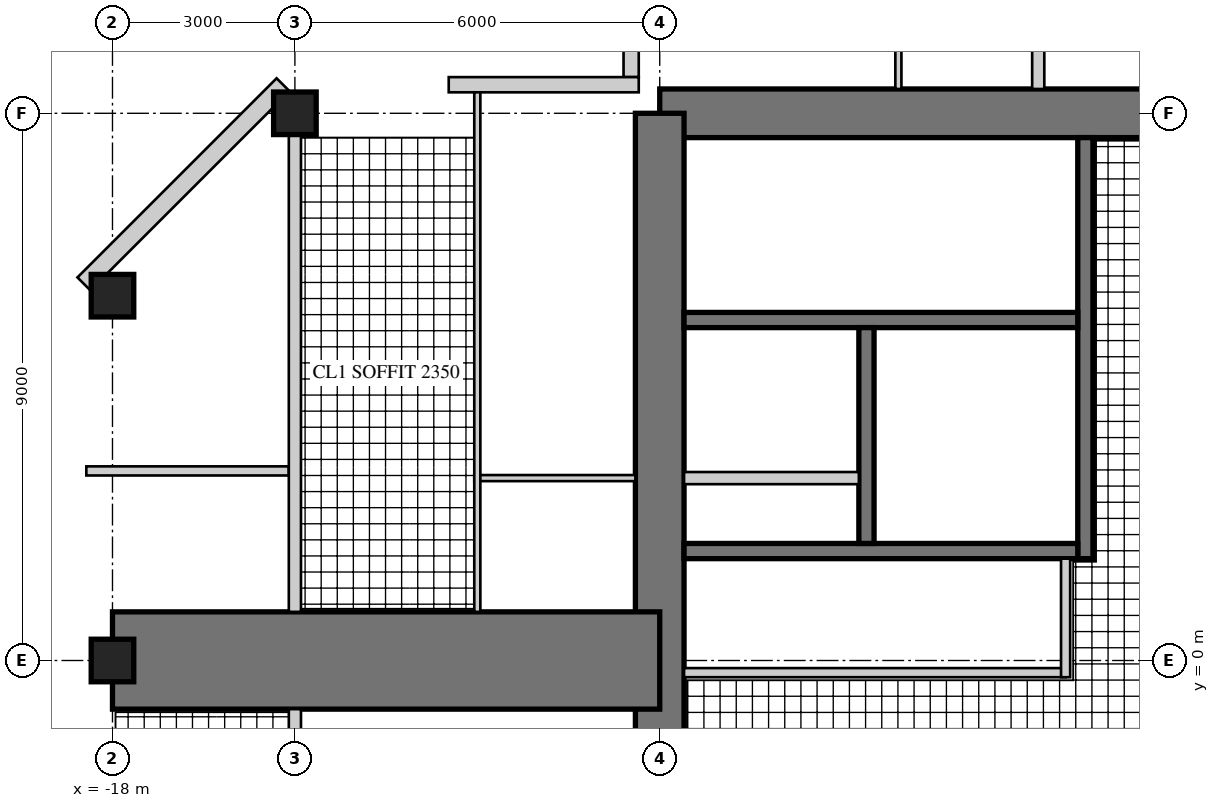
"""IFC4 building model, lengths in metres.
Left out: names, types, materials, properties, quantities, classifications, styles, units other than length and angle.
Written with IfcOpenShell. Run it as: python <this file> out.ifc"""

import sys

from ifc_helpers import new_model, si_unit, direction, frame, frame_2d, origin, origin_2d, place, context, subcontext, project, spatial, rectangle, hollow_rectangle, extrude, element, fill, save


model = new_model("IFC4")
c1 = context("Model", 3, precision=1e-05, world=origin(), true_north=direction((0.0, 1.0)))
c2 = subcontext(c1, "Body", "Model", "MODEL_VIEW")
j1 = project(units=[si_unit("LENGTHUNIT", "METRE"), si_unit("PLANEANGLEUNIT", "RADIAN")], contexts=[c1])
p1 = place(None, origin())
s1 = spatial("IfcSite", under=j1, at=p1, CompositionType="ELEMENT")
p2 = place(p1, origin())
s2 = spatial("IfcBuilding", under=s1, at=p2, CompositionType="ELEMENT")
p3 = place(p2, frame((0.0, 0.0, 261.1)))
s3 = spatial("IfcBuildingStorey", under=s2, at=p3, CompositionType="ELEMENT", Elevation=261.1)
p4 = place(p3, frame((9.0, 9.0, 0.0), z_axis=(0.0, 0.0, 1.0), x_axis=(-1.0, 0.0, 0.0)))
e1 = element("IfcWall", 1, at=p4, inside=s3, PredefinedType="SHEAR", context=c2, shape_type="SweptSolid", body=[
    extrude(rectangle(XDim=18.0, YDim=0.8, at=frame_2d((9.0, 0.0))), origin(), (0.0, 0.0, 1.0), 3.4),
])
p5 = place(p4, frame((9.8, 0.0, 0.0)))
e2 = element("IfcOpeningElement", 2, at=p5, cuts=e1, PredefinedType="OPENING", context=c2, shape_type="SweptSolid", body=[
    extrude(rectangle(XDim=1.0, YDim=2.4, at=frame_2d((0.5, 1.2))), frame((0.0, 0.41, 0.0), z_axis=(0.0, -1.0, 0.0), x_axis=(1.0, 0.0, 0.0)), (0.0, 0.0, 1.0), 0.82),
])
p6 = place(p3, frame((-9.0, 9.0, 0.0), z_axis=(0.0, 0.0, 1.0), x_axis=(0.0, -1.0, 0.0)))
e3 = element("IfcWall", 3, at=p6, inside=s3, PredefinedType="SHEAR", context=c2, shape_type="SweptSolid", body=[
    extrude(rectangle(XDim=18.0, YDim=0.8, at=frame_2d((9.0, 0.0))), origin(), (0.0, 0.0, 1.0), 3.4),
])
p7 = place(p6, frame((9.8, 0.0, 0.0)))
e4 = element("IfcOpeningElement", 4, at=p7, cuts=e3, PredefinedType="OPENING", context=c2, shape_type="SweptSolid", body=[
    extrude(rectangle(XDim=1.0, YDim=2.4, at=frame_2d((0.5, 1.2))), frame((0.0, 0.41, 0.0), z_axis=(0.0, -1.0, 0.0), x_axis=(1.0, 0.0, 0.0)), (0.0, 0.0, 1.0), 0.82),
])
p8 = place(p3, frame((-2.0, 1.675, 0.0), z_axis=(0.0, 0.0, 1.0), x_axis=(0.0, 1.0, 0.0)))
e5 = element("IfcWall", 5, at=p8, inside=s3, PredefinedType="SHEAR", context=c2, shape_type="SweptSolid", body=[
    extrude(rectangle(XDim=6.925, YDim=0.25, at=frame_2d((3.462, 0.0))), origin(), (0.0, 0.0, 1.0), 3.4),
])
p9 = place(p8, frame((0.725, 0.0, 0.0)))
e6 = element("IfcOpeningElement", 6, at=p9, cuts=e5, PredefinedType="OPENING", context=c2, shape_type="SweptSolid", body=[
    extrude(rectangle(XDim=1.0, YDim=2.1, at=frame_2d((0.5, 1.05))), frame((0.0, 0.135, 0.0), z_axis=(0.0, -1.0, 0.0), x_axis=(1.0, 0.0, 0.0)), (0.0, 0.0, 1.0), 0.27),
])
p10 = place(p3, frame((-2.125, 1.8, 0.0), z_axis=(0.0, 0.0, 1.0), x_axis=(-1.0, 0.0, 0.0)))
e7 = element("IfcWall", 7, at=p10, inside=s3, PredefinedType="SHEAR", context=c2, shape_type="SweptSolid", body=[
    extrude(rectangle(XDim=6.475, YDim=0.25, at=frame_2d((3.238, 0.0))), origin(), (0.0, 0.0, 1.0), 3.4),
])
p11 = place(p3, frame((-2.125, 5.6, 0.0), z_axis=(0.0, 0.0, 1.0), x_axis=(-1.0, 0.0, 0.0)))
e8 = element("IfcWall", 8, at=p11, inside=s3, PredefinedType="SHEAR", context=c2, shape_type="SweptSolid", body=[
    extrude(rectangle(XDim=6.475, YDim=0.25, at=frame_2d((3.238, 0.0))), origin(), (0.0, 0.0, 1.0), 3.4),
])
p12 = place(p11, frame((0.175, 0.0, 0.0)))
e9 = element("IfcOpeningElement", 9, at=p12, cuts=e8, PredefinedType="OPENING", context=c2, shape_type="SweptSolid", body=[
    extrude(rectangle(XDim=1.0, YDim=2.1, at=frame_2d((0.5, 1.05))), frame((0.0, 0.135, 0.0), z_axis=(0.0, -1.0, 0.0), x_axis=(1.0, 0.0, 0.0)), (0.0, 0.0, 1.0), 0.27),
])
p13 = place(p3, frame((-5.6, 1.925, 0.0), z_axis=(0.0, 0.0, 1.0), x_axis=(0.0, 1.0, 0.0)))
e10 = element("IfcWall", 10, at=p13, inside=s3, PredefinedType="SHEAR", context=c2, shape_type="SweptSolid", body=[
    extrude(rectangle(XDim=3.55, YDim=0.25, at=frame_2d((1.775, 0.0))), origin(), (0.0, 0.0, 1.0), 3.4),
])
p14 = place(p13, frame((1.525, 0.0, 0.0)))
e11 = element("IfcOpeningElement", 11, at=p14, cuts=e10, PredefinedType="OPENING", context=c2, shape_type="SweptSolid", body=[
    extrude(rectangle(XDim=1.1, YDim=2.2, at=frame_2d((0.55, 1.1))), frame((0.0, 0.135, 0.0), z_axis=(0.0, -1.0, 0.0), x_axis=(1.0, 0.0, 0.0)), (0.0, 0.0, 1.0), 0.27),
])
p15 = place(p13, frame((0.075, 0.0, 0.0)))
e12 = element("IfcOpeningElement", 12, at=p15, cuts=e10, PredefinedType="OPENING", context=c2, shape_type="SweptSolid", body=[
    extrude(rectangle(XDim=0.8, YDim=2.1, at=frame_2d((0.4, 1.05))), frame((0.0, 0.135, 0.0), z_axis=(0.0, -1.0, 0.0), x_axis=(1.0, 0.0, 0.0)), (0.0, 0.0, 1.0), 0.27),
])
p16 = place(p3, frame((-5.725, 3.0, 0.0), z_axis=(0.0, 0.0, 1.0), x_axis=(-1.0, 0.0, 0.0)))
e13 = element("IfcWall", 13, at=p16, inside=s3, PredefinedType="PARTITIONING", context=c2, shape_type="SweptSolid", body=[
    extrude(rectangle(XDim=2.875, YDim=0.2, at=frame_2d((1.438, 0.0))), origin(), (0.0, 0.0, 1.0), 3.4),
])
p17 = place(p3, frame((-9.0, 0.0, 0.0), z_axis=(0.0, 0.0, 1.0), x_axis=(-1.0, 0.0, 0.0)))
e14 = element("IfcWall", 14, at=p17, inside=s3, PredefinedType="SHEAR", context=c2, shape_type="SweptSolid", body=[
    extrude(rectangle(XDim=9.0, YDim=1.6, at=frame_2d((4.5, 0.0))), origin(), (0.0, 0.0, 1.0), 3.4),
])
p18 = place(p17, frame((3.8, 0.0, 0.0)))
e15 = element("IfcOpeningElement", 15, at=p18, cuts=e14, PredefinedType="OPENING", context=c2, shape_type="SweptSolid", body=[
    extrude(rectangle(XDim=1.0, YDim=2.15, at=frame_2d((0.5, 1.075))), frame((0.0, 0.81, 0.0), z_axis=(0.0, -1.0, 0.0), x_axis=(1.0, 0.0, 0.0)), (0.0, 0.0, 1.0), 1.62),
])
p19 = place(p17, frame((7.0, 0.0, 0.0)))
e16 = element("IfcOpeningElement", 16, at=p19, cuts=e14, PredefinedType="OPENING", context=c2, shape_type="SweptSolid", body=[
    extrude(rectangle(XDim=1.0, YDim=2.2, at=frame_2d((0.5, 1.1))), frame((0.0, 0.81, 0.0), z_axis=(0.0, -1.0, 0.0), x_axis=(1.0, 0.0, 0.0)), (0.0, 0.0, 1.0), 1.62),
])
for number, where, z_axis, x_axis in (
    (17, (-15.0, 9.0, 0.0), (0.0, 0.0, 1.0), (1.0, 0.0, 0.0)),
    (18, (-18.0, 6.0, 0.0), (0.0, 0.0, 1.0), (1.0, 0.0, 0.0)),
    (19, (-18.0, 0.0, 0.0), (0.0, 0.0, 1.0), (1.0, 0.0, 0.0)),
):
    element("IfcColumn", number, at=place(p3, frame(where, z_axis=z_axis, x_axis=x_axis)), inside=s3, PredefinedType="COLUMN", context=c2, shape_type="SweptSolid", body=[
        extrude(rectangle(XDim=0.7, YDim=0.7, at=origin_2d()), origin(), (0.0, 0.0, 1.0), 3.4),
    ])
p20 = place(p3, frame((-9.47, 12.47, 0.0), z_axis=(0.0, 0.0, 1.0), x_axis=(0.0, -1.0, 0.0)))
e20 = element("IfcWall", 20, at=p20, inside=s3, PredefinedType="SOLIDWALL", context=c2, shape_type="SweptSolid", body=[
    extrude(rectangle(XDim=2.875, YDim=0.25, at=frame_2d((1.438, 0.0))), origin(), (0.0, 0.0, 1.0), 3.22),
])
p21 = place(p20, frame((0.6, 0.0, 0.0)))
e21 = element("IfcOpeningElement", 21, at=p21, cuts=e20, PredefinedType="OPENING", context=c2, shape_type="SweptSolid", body=[
    extrude(rectangle(XDim=1.0, YDim=2.2, at=frame_2d((0.5, 1.1))), frame((0.0, 0.135, 0.0), z_axis=(0.0, -1.0, 0.0), x_axis=(1.0, 0.0, 0.0)), (0.0, 0.0, 1.0), 0.27),
])
p22 = place(p3, frame((-9.345, 9.47, 0.0), z_axis=(0.0, 0.0, 1.0), x_axis=(-1.0, 0.0, 0.0)))
e22 = element("IfcWall", 22, at=p22, inside=s3, PredefinedType="SOLIDWALL", context=c2, shape_type="SweptSolid", body=[
    extrude(rectangle(XDim=3.125, YDim=0.25, at=frame_2d((1.562, 0.0))), origin(), (0.0, 0.0, 1.0), 3.22),
])
p23 = place(p22, frame((0.6, 0.0, 0.0)))
e23 = element("IfcOpeningElement", 23, at=p23, cuts=e22, PredefinedType="OPENING", context=c2, shape_type="SweptSolid", body=[
    extrude(rectangle(XDim=1.0, YDim=2.2, at=frame_2d((0.5, 1.1))), frame((0.0, 0.135, 0.0), z_axis=(0.0, -1.0, 0.0), x_axis=(1.0, 0.0, 0.0)), (0.0, 0.0, 1.0), 0.27),
])
p24 = place(p3, frame((-15.195, 9.47, 0.0), z_axis=(0.0, 0.0, 1.0), x_axis=(-0.707106781187, -0.707106781187, 0.0)))
e24 = element("IfcWall", 24, at=p24, inside=s3, PredefinedType="SOLIDWALL", context=c2, shape_type="SweptSolid", body=[
    extrude(rectangle(XDim=4.632, YDim=0.3, at=frame_2d((2.316, 0.0))), origin(), (0.0, 0.0, 1.0), 3.22),
])
p25 = place(p24, frame((1.866, 0.0, 0.3)))
e25 = element("IfcOpeningElement", 25, at=p25, cuts=e24, PredefinedType="OPENING", context=c2, shape_type="SweptSolid", body=[
    extrude(rectangle(XDim=0.9, YDim=2.4, at=frame_2d((0.45, 1.2))), frame((0.0, 0.16, 0.0), z_axis=(0.0, -1.0, 0.0), x_axis=(1.0, 0.0, 0.0)), (0.0, 0.0, 1.0), 0.32),
])
p26 = place(p3, frame((-2.325, -0.2, 0.0), z_axis=(0.0, 0.0, 1.0), x_axis=(-1.0, 0.0, 0.0)))
e26 = element("IfcWall", 26, at=p26, inside=s3, PredefinedType="PARTITIONING", context=c2, shape_type="SweptSolid", body=[
    extrude(rectangle(XDim=6.275, YDim=0.15, at=frame_2d((3.138, 0.0))), origin(), (0.0, 0.0, 1.0), 3.22),
])
p27 = place(p26, frame((0.4, 0.0, 0.0)))
e27 = element("IfcOpeningElement", 27, at=p27, cuts=e26, PredefinedType="OPENING", context=c2, shape_type="SweptSolid", body=[
    extrude(rectangle(XDim=1.0, YDim=2.1, at=frame_2d((0.5, 1.05))), frame((0.0, 0.085, 0.0), z_axis=(0.0, -1.0, 0.0), x_axis=(1.0, 0.0, 0.0)), (0.0, 0.0, 1.0), 0.17),
])
p28 = place(p3, frame((-2.325, 1.675, 0.0), z_axis=(0.0, 0.0, 1.0), x_axis=(0.0, -1.0, 0.0)))
e28 = element("IfcWall", 28, at=p28, inside=s3, PredefinedType="PARTITIONING", context=c2, shape_type="SweptSolid", body=[
    extrude(rectangle(XDim=1.95, YDim=0.15, at=frame_2d((0.975, 0.0))), origin(), (0.0, 0.0, 1.0), 3.22),
])
p29 = place(p3, frame((-5.075, 9.4, 0.0), z_axis=(0.0, 0.0, 1.0), x_axis=(0.0, 1.0, 0.0)))
e29 = element("IfcWall", 29, at=p29, inside=s3, PredefinedType="PARTITIONING", context=c2, shape_type="SweptSolid", body=[
    extrude(rectangle(XDim=3.25, YDim=0.1, at=frame_2d((1.625, 0.0))), origin(), (0.0, 0.0, 1.0), 3.22),
])
p30 = place(p3, frame((-2.775, 9.4, 0.0), z_axis=(0.0, 0.0, 1.0), x_axis=(0.0, 1.0, 0.0)))
e30 = element("IfcWall", 30, at=p30, inside=s3, PredefinedType="SOLIDWALL", context=c2, shape_type="SweptSolid", body=[
    extrude(rectangle(XDim=5.6, YDim=0.2, at=frame_2d((2.8, 0.0))), origin(), (0.0, 0.0, 1.0), 3.22),
])
p31 = place(p30, frame((3.75, 0.0, 0.0)))
e31 = element("IfcOpeningElement", 31, at=p31, cuts=e30, PredefinedType="OPENING", context=c2, shape_type="SweptSolid", body=[
    extrude(rectangle(XDim=1.0, YDim=2.15, at=frame_2d((0.5, 1.075))), frame((0.0, 0.11, 0.0), z_axis=(0.0, -1.0, 0.0), x_axis=(1.0, 0.0, 0.0)), (0.0, 0.0, 1.0), 0.22),
])
p32 = place(p3, frame((-9.4, 3.0, 0.0), z_axis=(0.0, 0.0, 1.0), x_axis=(-1.0, 0.0, 0.0)))
e32 = element("IfcWall", 32, at=p32, inside=s3, PredefinedType="PARTITIONING", context=c2, shape_type="SweptSolid", body=[
    extrude(rectangle(XDim=2.65, YDim=0.1, at=frame_2d((1.325, 0.0))), origin(), (0.0, 0.0, 1.0), 3.22),
])
p33 = place(p3, frame((-12.0, 9.345, 0.0), z_axis=(0.0, 0.0, 1.0), x_axis=(0.0, -1.0, 0.0)))
e33 = element("IfcWall", 33, at=p33, inside=s3, PredefinedType="PARTITIONING", context=c2, shape_type="SweptSolid", body=[
    extrude(rectangle(XDim=8.545, YDim=0.1, at=frame_2d((4.272, 0.0))), origin(), (0.0, 0.0, 1.0), 3.22),
])
p34 = place(p33, frame((4.995, 0.0, 0.0)))
e34 = element("IfcOpeningElement", 34, at=p34, cuts=e33, PredefinedType="OPENING", context=c2, shape_type="SweptSolid", body=[
    extrude(rectangle(XDim=0.9, YDim=2.1, at=frame_2d((0.45, 1.05))), frame((0.0, 0.06, 0.0), z_axis=(0.0, -1.0, 0.0), x_axis=(1.0, 0.0, 0.0)), (0.0, 0.0, 1.0), 0.12),
])
p35 = place(p33, frame((7.095, 0.0, 0.0)))
e35 = element("IfcOpeningElement", 35, at=p35, cuts=e33, PredefinedType="OPENING", context=c2, shape_type="SweptSolid", body=[
    extrude(rectangle(XDim=0.9, YDim=2.1, at=frame_2d((0.45, 1.05))), frame((0.0, 0.06, 0.0), z_axis=(0.0, -1.0, 0.0), x_axis=(1.0, 0.0, 0.0)), (0.0, 0.0, 1.0), 0.12),
])
p36 = place(p3, frame((-15.1, 3.118, 0.0), z_axis=(0.0, 0.0, 1.0), x_axis=(-1.0, 0.0, 0.0)))
e36 = element("IfcWall", 36, at=p36, inside=s3, PredefinedType="PARTITIONING", context=c2, shape_type="SweptSolid", body=[
    extrude(rectangle(XDim=3.33, YDim=0.15, at=frame_2d((1.665, 0.0))), origin(), (0.0, 0.0, 1.0), 3.22),
])
p37 = place(p36, frame((0.6, 0.0, 0.0)))
e37 = element("IfcOpeningElement", 37, at=p37, cuts=e36, PredefinedType="OPENING", context=c2, shape_type="SweptSolid", body=[
    extrude(rectangle(XDim=1.0, YDim=2.1, at=frame_2d((0.5, 1.05))), frame((0.0, 0.085, 0.0), z_axis=(0.0, -1.0, 0.0), x_axis=(1.0, 0.0, 0.0)), (0.0, 0.0, 1.0), 0.17),
])
p38 = place(p3, frame((-15.0, 8.65, 0.0), z_axis=(0.0, 0.0, 1.0), x_axis=(0.0, -1.0, 0.0)))
e38 = element("IfcWall", 38, at=p38, inside=s3, PredefinedType="SOLIDWALL", context=c2, shape_type="SweptSolid", body=[
    extrude(rectangle(XDim=7.85, YDim=0.2, at=frame_2d((3.925, 0.0))), origin(), (0.0, 0.0, 1.0), 2.52),
])
p39 = place(p3, frame((-15.0, -0.8, 0.0), z_axis=(0.0, 0.0, 1.0), x_axis=(0.0, -1.0, 0.0)))
e39 = element("IfcWall", 39, at=p39, inside=s3, PredefinedType="SOLIDWALL", context=c2, shape_type="SweptSolid", body=[
    extrude(rectangle(XDim=7.85, YDim=0.2, at=frame_2d((3.925, 0.0))), origin(), (0.0, 0.0, 1.0), 2.52),
])
p40 = place(p39, frame((0.35, 0.0, 0.0)))
e40 = element("IfcOpeningElement", 40, at=p40, cuts=e39, PredefinedType="OPENING", context=c2, shape_type="SweptSolid", body=[
    extrude(rectangle(XDim=1.0, YDim=2.2, at=frame_2d((0.5, 1.1))), frame((0.0, 0.11, 0.0), z_axis=(0.0, -1.0, 0.0), x_axis=(1.0, 0.0, 0.0)), (0.0, 0.0, 1.0), 0.22),
])
p41 = place(p23, origin())
e41 = element("IfcDoor", 41, at=p41, inside=s3, OperationType="SINGLE_SWING_LEFT", PredefinedType="DOOR", context=c2, shape_type="SweptSolid", body=[
    extrude(hollow_rectangle(XDim=1.0, YDim=2.2, WallThickness=0.06, at=frame_2d((0.5, 1.1))), frame((0.0, 0.025, 0.0), z_axis=(0.0, -1.0, 0.0), x_axis=(1.0, 0.0, 0.0)), (0.0, 0.0, 1.0), 0.05),
    extrude(rectangle(XDim=0.879, YDim=2.079, at=frame_2d((0.5, 1.1))), frame((0.0, 0.025, 0.0), z_axis=(0.0, -1.0, 0.0), x_axis=(1.0, 0.0, 0.0)), (0.0, 0.0, 1.0), 0.05),
])
fill(e23, e41)
p42 = place(p25, origin())
e42 = element("IfcWindow", 42, at=p42, inside=s3, PartitioningType="SINGLE_PANEL", PredefinedType="WINDOW", context=c2, shape_type="SweptSolid", body=[
    extrude(hollow_rectangle(XDim=0.9, YDim=2.4, WallThickness=0.06, at=frame_2d((0.45, 1.2))), frame((0.0, 0.03, 0.0), z_axis=(0.0, -1.0, 0.0), x_axis=(1.0, 0.0, 0.0)), (0.0, 0.0, 1.0), 0.06),
    extrude(rectangle(XDim=0.779, YDim=2.279, at=frame_2d((0.45, 1.2))), frame((0.0, 0.03, 0.0), z_axis=(0.0, -1.0, 0.0), x_axis=(1.0, 0.0, 0.0)), (0.0, 0.0, 1.0), 0.06),
])
fill(e25, e42)
p43 = place(p27, frame((1.0, 0.0, 0.0), z_axis=(0.0, 0.0, 1.0), x_axis=(-1.0, 0.0, 0.0)))
e43 = element("IfcDoor", 43, at=p43, inside=s3, OperationType="SINGLE_SWING_RIGHT", PredefinedType="DOOR", context=c2, shape_type="SweptSolid", body=[
    extrude(rectangle(XDim=1.0, YDim=2.1, at=frame_2d((0.5, 1.05))), frame((0.0, 0.025, 0.0), z_axis=(0.0, -1.0, 0.0), x_axis=(1.0, 0.0, 0.0)), (0.0, 0.0, 1.0), 0.05),
])
fill(e27, e43)
p44 = place(p34, origin())
e44 = element("IfcDoor", 44, at=p44, inside=s3, OperationType="SINGLE_SWING_RIGHT", PredefinedType="DOOR", context=c2, shape_type="SweptSolid", body=[
    extrude(rectangle(XDim=0.9, YDim=2.1, at=frame_2d((0.45, 1.05))), frame((0.0, 0.025, 0.0), z_axis=(0.0, -1.0, 0.0), x_axis=(1.0, 0.0, 0.0)), (0.0, 0.0, 1.0), 0.05),
])
fill(e34, e44)
p45 = place(p35, origin())
e45 = element("IfcDoor", 45, at=p45, inside=s3, OperationType="SINGLE_SWING_RIGHT", PredefinedType="DOOR", context=c2, shape_type="SweptSolid", body=[
    extrude(rectangle(XDim=0.9, YDim=2.1, at=frame_2d((0.45, 1.05))), frame((0.0, 0.025, 0.0), z_axis=(0.0, -1.0, 0.0), x_axis=(1.0, 0.0, 0.0)), (0.0, 0.0, 1.0), 0.05),
])
fill(e35, e45)
p46 = place(p37, origin())
e46 = element("IfcDoor", 46, at=p46, inside=s3, OperationType="SINGLE_SWING_LEFT", PredefinedType="DOOR", context=c2, shape_type="SweptSolid", body=[
    extrude(rectangle(XDim=1.0, YDim=2.1, at=frame_2d((0.5, 1.05))), frame((0.0, 0.025, 0.0), z_axis=(0.0, -1.0, 0.0), x_axis=(1.0, 0.0, 0.0)), (0.0, 0.0, 1.0), 0.05),
])
fill(e37, e46)
p47 = place(p18, frame((1.0, 0.0, 0.0), z_axis=(0.0, 0.0, 1.0), x_axis=(-1.0, 0.0, 0.0)))
e47 = element("IfcDoor", 47, at=p47, inside=s3, OperationType="SINGLE_SWING_RIGHT", PredefinedType="DOOR", context=c2, shape_type="SweptSolid", body=[
    extrude(rectangle(XDim=1.0, YDim=2.15, at=frame_2d((0.5, 1.075))), frame((0.0, 0.025, 0.0), z_axis=(0.0, -1.0, 0.0), x_axis=(1.0, 0.0, 0.0)), (0.0, 0.0, 1.0), 0.05),
])
fill(e15, e47)
p48 = place(p19, frame((1.0, 0.0, 0.0), z_axis=(0.0, 0.0, 1.0), x_axis=(-1.0, 0.0, 0.0)))
e48 = element("IfcDoor", 48, at=p48, inside=s3, OperationType="SINGLE_SWING_RIGHT", PredefinedType="DOOR", context=c2, shape_type="SweptSolid", body=[
    extrude(rectangle(XDim=1.0, YDim=2.2, at=frame_2d((0.5, 1.1))), frame((0.0, 0.025, 0.0), z_axis=(0.0, -1.0, 0.0), x_axis=(1.0, 0.0, 0.0)), (0.0, 0.0, 1.0), 0.05),
])
fill(e16, e48)
p49 = place(p5, origin())
e49 = element("IfcDoor", 49, at=p49, inside=s3, OperationType="SINGLE_SWING_RIGHT", PredefinedType="DOOR", context=c2, shape_type="SweptSolid", body=[
    extrude(rectangle(XDim=1.0, YDim=2.4, at=frame_2d((0.5, 1.2))), frame((0.0, 0.055, 0.0), z_axis=(0.0, -1.0, 0.0), x_axis=(1.0, 0.0, 0.0)), (0.0, 0.0, 1.0), 0.05),
])
fill(e2, e49)
p50 = place(p7, origin())
e50 = element("IfcDoor", 50, at=p50, inside=s3, OperationType="SINGLE_SWING_RIGHT", PredefinedType="DOOR", context=c2, shape_type="SweptSolid", body=[
    extrude(rectangle(XDim=1.0, YDim=2.4, at=frame_2d((0.5, 1.2))), frame((0.0, 0.055, 0.0), z_axis=(0.0, -1.0, 0.0), x_axis=(1.0, 0.0, 0.0)), (0.0, 0.0, 1.0), 0.05),
])
fill(e4, e50)
p51 = place(p9, origin())
e51 = element("IfcDoor", 51, at=p51, inside=s3, OperationType="SINGLE_SWING_LEFT", PredefinedType="DOOR", context=c2, shape_type="SweptSolid", body=[
    extrude(rectangle(XDim=1.0, YDim=2.1, at=frame_2d((0.5, 1.05))), frame((0.0, 0.025, 0.0), z_axis=(0.0, -1.0, 0.0), x_axis=(1.0, 0.0, 0.0)), (0.0, 0.0, 1.0), 0.05),
])
fill(e6, e51)
p52 = place(p12, frame((1.0, 0.0, 0.0), z_axis=(0.0, 0.0, 1.0), x_axis=(-1.0, 0.0, 0.0)))
e52 = element("IfcDoor", 52, at=p52, inside=s3, OperationType="SINGLE_SWING_RIGHT", PredefinedType="DOOR", context=c2, shape_type="SweptSolid", body=[
    extrude(rectangle(XDim=1.0, YDim=2.1, at=frame_2d((0.5, 1.05))), frame((0.0, 0.025, 0.0), z_axis=(0.0, -1.0, 0.0), x_axis=(1.0, 0.0, 0.0)), (0.0, 0.0, 1.0), 0.05),
])
fill(e9, e52)
p53 = place(p14, origin())
e53 = element("IfcDoor", 53, at=p53, inside=s3, OperationType="DOUBLE_DOOR_SLIDING", PredefinedType="DOOR", context=c2, shape_type="SweptSolid", body=[
    extrude(rectangle(XDim=1.1, YDim=2.2, at=frame_2d((0.55, 1.1))), frame((0.0, 0.025, 0.0), z_axis=(0.0, -1.0, 0.0), x_axis=(1.0, 0.0, 0.0)), (0.0, 0.0, 1.0), 0.05),
])
fill(e11, e53)
p54 = place(p15, origin())
e54 = element("IfcDoor", 54, at=p54, inside=s3, OperationType="SINGLE_SWING_LEFT", PredefinedType="DOOR", context=c2, shape_type="SweptSolid", body=[
    extrude(rectangle(XDim=0.8, YDim=2.1, at=frame_2d((0.4, 1.05))), frame((0.0, 0.025, 0.0), z_axis=(0.0, -1.0, 0.0), x_axis=(1.0, 0.0, 0.0)), (0.0, 0.0, 1.0), 0.05),
])
fill(e12, e54)
save(model, sys.argv[1])
